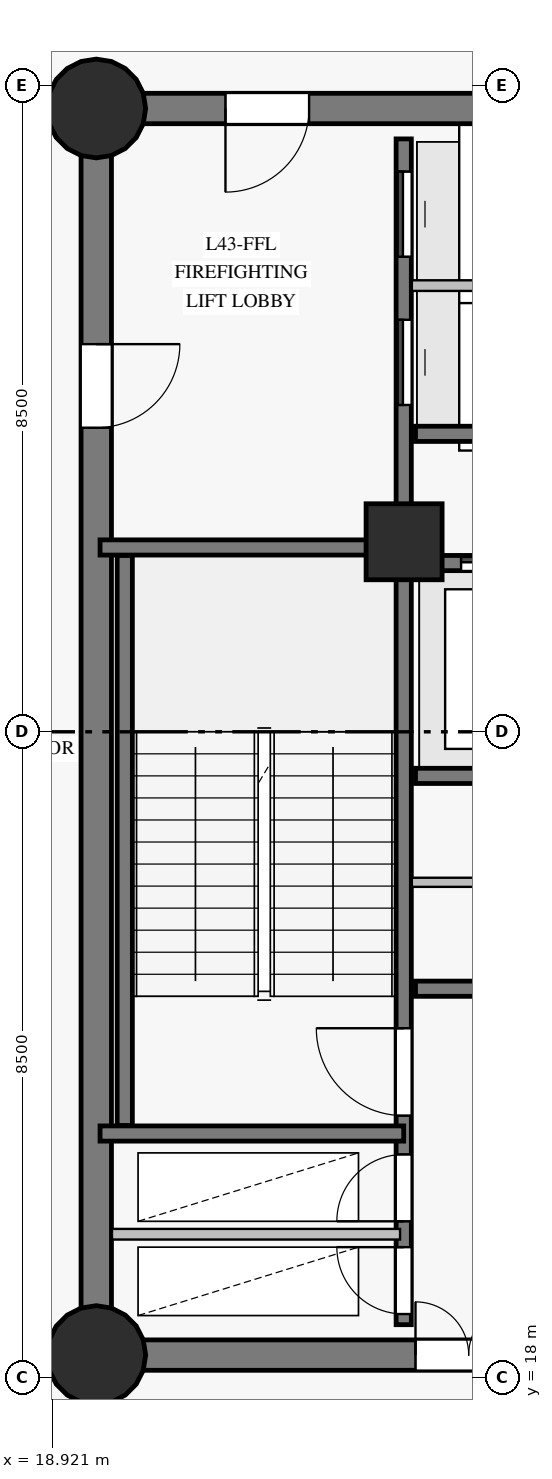
"""IFC4 building model, lengths in metres.
Left out: names, types, materials, properties, quantities, classifications, styles, units other than length and angle.
Written with IfcOpenShell. Run it as: python <this file> out.ifc"""

import sys

from ifc_helpers import new_model, si_unit, direction, frame, frame_2d, origin, origin_with_axes, origin_2d, place, context, subcontext, project, spatial, rectangle, circle, extrude, source, transform, mapped, element, fill, save


model = new_model("IFC4")
c1 = context("Model", 3, precision=1e-05, world=origin(), true_north=direction((0.0, 1.0)))
c2 = subcontext(c1, "Body", "Model", "MODEL_VIEW")
j1 = project(units=[si_unit("LENGTHUNIT", "METRE"), si_unit("PLANEANGLEUNIT", "RADIAN")], contexts=[c1])
p1 = place(None, origin())
s1 = spatial("IfcSite", under=j1, at=p1, CompositionType="ELEMENT")
p2 = place(p1, origin())
s2 = spatial("IfcBuilding", under=s1, at=p2, CompositionType="ELEMENT")
p3 = place(p2, frame((0.0, 0.0, 152.55)))
s3 = spatial("IfcBuildingStorey", under=s2, at=p3, CompositionType="ELEMENT", Elevation=152.55)
p4 = place(p3, frame((19.5, 18.3, 0.0), z_axis=(0.0, 0.0, 1.0), x_axis=(1.0, 0.0, 0.0)))
e1 = element("IfcWall", 1, at=p4, inside=s3, PredefinedType="SHEAR", context=c2, shape_type="SweptSolid", body=[
    extrude(rectangle(XDim=7.05, YDim=0.4, at=frame_2d((3.525, 0.0))), origin(), (0.0, 0.0, 1.0), 3.775),
])
p5 = place(p4, frame((4.2, 0.0, 0.0)))
e2 = element("IfcOpeningElement", 2, at=p5, cuts=e1, PredefinedType="OPENING", context=c2, shape_type="SweptSolid", body=[
    extrude(rectangle(XDim=1.4, YDim=2.2, at=frame_2d((0.7, 1.1))), frame((0.0, 0.21, 0.0), z_axis=(0.0, -1.0, 0.0), x_axis=(1.0, 0.0, 0.0)), (0.0, 0.0, 1.0), 0.42),
])
p6 = place(p3, frame((26.55, 34.7, 0.0), z_axis=(0.0, 0.0, 1.0), x_axis=(-1.0, 0.0, 0.0)))
e3 = element("IfcWall", 3, at=p6, inside=s3, PredefinedType="SHEAR", context=c2, shape_type="SweptSolid", body=[
    extrude(rectangle(XDim=7.05, YDim=0.4, at=frame_2d((3.525, 0.0))), origin(), (0.0, 0.0, 1.0), 3.775),
])
p7 = place(p6, frame((4.25, 0.0, 0.0)))
e4 = element("IfcOpeningElement", 4, at=p7, cuts=e3, PredefinedType="OPENING", context=c2, shape_type="SweptSolid", body=[
    extrude(rectangle(XDim=1.1, YDim=2.15, at=frame_2d((0.55, 1.075))), frame((0.0, 0.21, 0.0), z_axis=(0.0, -1.0, 0.0), x_axis=(1.0, 0.0, 0.0)), (0.0, 0.0, 1.0), 0.42),
])
p8 = place(p3, frame((19.5, 34.7, 0.0), z_axis=(0.0, 0.0, 1.0), x_axis=(0.0, -1.0, 0.0)))
e5 = element("IfcWall", 5, at=p8, inside=s3, PredefinedType="SHEAR", context=c2, shape_type="SweptSolid", body=[
    extrude(rectangle(XDim=16.4, YDim=0.4, at=frame_2d((8.2, 0.0))), origin(), (0.0, 0.0, 1.0), 3.775),
])
p9 = place(p8, frame((3.1, 0.0, 0.0)))
e6 = element("IfcOpeningElement", 6, at=p9, cuts=e5, PredefinedType="OPENING", context=c2, shape_type="SweptSolid", body=[
    extrude(rectangle(XDim=1.1, YDim=2.15, at=frame_2d((0.55, 1.075))), frame((0.0, 0.21, 0.0), z_axis=(0.0, -1.0, 0.0), x_axis=(1.0, 0.0, 0.0)), (0.0, 0.0, 1.0), 0.42),
])
m1 = source(origin_with_axes(), c2, "Body", "SweptSolid", [
    extrude(circle(Radius=0.65, at=origin_2d()), origin(), (0.0, 0.0, 1.0), 4.0),
])
for number, where, z_axis, x_axis in (
    (7, (19.5, 18.3, 0.0), (0.0, 0.0, 1.0), (1.0, 0.0, 0.0)),
    (8, (19.5, 34.7, 0.0), (0.0, 0.0, 1.0), (1.0, 0.0, 0.0)),
):
    element("IfcColumn", number, at=place(p3, frame(where, z_axis=z_axis, x_axis=x_axis)), inside=s3, PredefinedType="COLUMN", context=c2, shape_type="MappedRepresentation", body=[
        mapped(m1, transform((0.0, 0.0, 0.0), scale=1.0)),
    ])
m2 = source(origin_with_axes(), c2, "Body", "SweptSolid", [
    extrude(rectangle(XDim=1.0, YDim=1.0, at=origin_2d()), origin(), (0.0, 0.0, 1.0), 4.0),
])
p10 = place(p3, frame((23.55, 29.0, 0.0), z_axis=(0.0, 0.0, 1.0), x_axis=(1.0, 0.0, 0.0)))
e9 = element("IfcColumn", 9, at=p10, inside=s3, PredefinedType="COLUMN", context=c2, shape_type="MappedRepresentation", body=[
    mapped(m2, transform((0.0, 0.0, 0.0), scale=1.0)),
])
p11 = place(p3, frame((23.545, 18.7, 0.0), z_axis=(0.0, 0.0, 1.0), x_axis=(0.0, 1.0, 0.0)))
e10 = element("IfcWall", 10, at=p11, inside=s3, PredefinedType="SHEAR", context=c2, shape_type="SweptSolid", body=[
    extrude(rectangle(XDim=15.6, YDim=0.2, at=frame_2d((7.8, 0.0))), origin(), (0.0, 0.0, 1.0), 3.775),
])
p12 = place(p11, frame((2.75, 0.0, 0.0)))
e11 = element("IfcOpeningElement", 11, at=p12, cuts=e10, PredefinedType="OPENING", context=c2, shape_type="SweptSolid", body=[
    extrude(rectangle(XDim=1.15, YDim=2.15, at=frame_2d((0.575, 1.075))), frame((0.0, 0.11, 0.0), z_axis=(0.0, -1.0, 0.0), x_axis=(1.0, 0.0, 0.0)), (0.0, 0.0, 1.0), 0.22),
])
p13 = place(p11, frame((0.14, 0.0, 0.0)))
e12 = element("IfcOpeningElement", 12, at=p13, cuts=e10, PredefinedType="OPENING", context=c2, shape_type="SweptSolid", body=[
    extrude(rectangle(XDim=0.88, YDim=2.1, at=frame_2d((0.44, 1.05))), frame((0.0, 0.11, 0.0), z_axis=(0.0, -1.0, 0.0), x_axis=(1.0, 0.0, 0.0)), (0.0, 0.0, 1.0), 0.22),
])
p14 = place(p11, frame((1.36, 0.0, 0.0)))
e13 = element("IfcOpeningElement", 13, at=p14, cuts=e10, PredefinedType="OPENING", context=c2, shape_type="SweptSolid", body=[
    extrude(rectangle(XDim=0.88, YDim=2.1, at=frame_2d((0.44, 1.05))), frame((0.0, 0.11, 0.0), z_axis=(0.0, -1.0, 0.0), x_axis=(1.0, 0.0, 0.0)), (0.0, 0.0, 1.0), 0.22),
])
p15 = place(p11, frame((12.1, 0.0, 0.0)))
e14 = element("IfcOpeningElement", 14, at=p15, cuts=e10, PredefinedType="OPENING", context=c2, shape_type="SweptSolid", body=[
    extrude(rectangle(XDim=1.12, YDim=2.15, at=frame_2d((0.56, 1.075))), frame((0.0, 0.11, 0.0), z_axis=(0.0, -1.0, 0.0), x_axis=(1.0, 0.0, 0.0)), (0.0, 0.0, 1.0), 0.22),
])
p16 = place(p11, frame((14.05, 0.0, 0.0)))
e15 = element("IfcOpeningElement", 15, at=p16, cuts=e10, PredefinedType="OPENING", context=c2, shape_type="SweptSolid", body=[
    extrude(rectangle(XDim=1.12, YDim=2.15, at=frame_2d((0.56, 1.075))), frame((0.0, 0.11, 0.0), z_axis=(0.0, -1.0, 0.0), x_axis=(1.0, 0.0, 0.0)), (0.0, 0.0, 1.0), 0.22),
])
p17 = place(p3, frame((23.7, 23.12, 0.0), z_axis=(0.0, 0.0, 1.0), x_axis=(1.0, 0.0, 0.0)))
e16 = element("IfcWall", 16, at=p17, inside=s3, PredefinedType="SHEAR", context=c2, shape_type="SweptSolid", body=[
    extrude(rectangle(XDim=9.6, YDim=0.2, at=frame_2d((4.8, 0.0))), origin(), (0.0, 0.0, 1.0), 3.775),
])
p18 = place(p17, frame((2.4, 0.0, 0.0)))
e17 = element("IfcOpeningElement", 17, at=p18, cuts=e16, PredefinedType="OPENING", context=c2, shape_type="SweptSolid", body=[
    extrude(rectangle(XDim=1.0, YDim=2.15, at=frame_2d((0.5, 1.075))), frame((0.0, 0.11, 0.0), z_axis=(0.0, -1.0, 0.0), x_axis=(1.0, 0.0, 0.0)), (0.0, 0.0, 1.0), 0.22),
])
p19 = place(p3, frame((23.7, 25.92, 0.0), z_axis=(0.0, 0.0, 1.0), x_axis=(1.0, 0.0, 0.0)))
e18 = element("IfcWall", 18, at=p19, inside=s3, PredefinedType="SHEAR", context=c2, shape_type="SweptSolid", body=[
    extrude(rectangle(XDim=9.6, YDim=0.2, at=frame_2d((4.8, 0.0))), origin(), (0.0, 0.0, 1.0), 3.775),
])
p20 = place(p3, frame((23.7, 28.72, 0.0), z_axis=(0.0, 0.0, 1.0), x_axis=(1.0, 0.0, 0.0)))
e19 = element("IfcWall", 19, at=p20, inside=s3, PredefinedType="SHEAR", context=c2, shape_type="SweptSolid", body=[
    extrude(rectangle(XDim=9.6, YDim=0.2, at=frame_2d((4.8, 0.0))), origin(), (0.0, 0.0, 1.0), 3.775),
])
p21 = place(p20, frame((0.6, 0.0, 0.0)))
e20 = element("IfcOpeningElement", 20, at=p21, cuts=e19, PredefinedType="OPENING", context=c2, shape_type="SweptSolid", body=[
    extrude(rectangle(XDim=1.1, YDim=2.15, at=frame_2d((0.55, 1.075))), frame((0.0, 0.11, 0.0), z_axis=(0.0, -1.0, 0.0), x_axis=(1.0, 0.0, 0.0)), (0.0, 0.0, 1.0), 0.22),
])
p22 = place(p20, frame((2.98, 0.0, 0.0)))
e21 = element("IfcOpeningElement", 21, at=p22, cuts=e19, PredefinedType="OPENING", context=c2, shape_type="SweptSolid", body=[
    extrude(rectangle(XDim=1.1, YDim=2.15, at=frame_2d((0.55, 1.075))), frame((0.0, 0.11, 0.0), z_axis=(0.0, -1.0, 0.0), x_axis=(1.0, 0.0, 0.0)), (0.0, 0.0, 1.0), 0.22),
])
p23 = place(p20, frame((5.36, 0.0, 0.0)))
e22 = element("IfcOpeningElement", 22, at=p23, cuts=e19, PredefinedType="OPENING", context=c2, shape_type="SweptSolid", body=[
    extrude(rectangle(XDim=1.1, YDim=2.15, at=frame_2d((0.55, 1.075))), frame((0.0, 0.11, 0.0), z_axis=(0.0, -1.0, 0.0), x_axis=(1.0, 0.0, 0.0)), (0.0, 0.0, 1.0), 0.22),
])
p24 = place(p20, frame((7.74, 0.0, 0.0)))
e23 = element("IfcOpeningElement", 23, at=p24, cuts=e19, PredefinedType="OPENING", context=c2, shape_type="SweptSolid", body=[
    extrude(rectangle(XDim=1.1, YDim=2.15, at=frame_2d((0.55, 1.075))), frame((0.0, 0.11, 0.0), z_axis=(0.0, -1.0, 0.0), x_axis=(1.0, 0.0, 0.0)), (0.0, 0.0, 1.0), 0.22),
])
p25 = place(p3, frame((19.875, 21.32, 0.0), z_axis=(0.0, 0.0, 1.0), x_axis=(0.0, 1.0, 0.0)))
e24 = element("IfcWall", 24, at=p25, inside=s3, PredefinedType="SHEAR", context=c2, shape_type="SweptSolid", body=[
    extrude(rectangle(XDim=7.5, YDim=0.2, at=frame_2d((3.75, 0.0))), origin(), (0.0, 0.0, 1.0), 3.775),
])
for number, where, z_axis, x_axis in (
    (25, (19.55, 21.215, 0.0), (0.0, 0.0, 1.0), (1.0, 0.0, 0.0)),
    (26, (19.55, 28.925, 0.0), (0.0, 0.0, 1.0), (1.0, 0.0, 0.0)),
):
    element("IfcWall", number, at=place(p3, frame(where, z_axis=z_axis, x_axis=x_axis)), inside=s3, PredefinedType="SHEAR", context=c2, shape_type="SweptSolid", body=[
        extrude(rectangle(XDim=3.995, YDim=0.2, at=frame_2d((1.998, 0.0))), origin(), (0.0, 0.0, 1.0), 3.775),
    ])
p26 = place(p3, frame((23.7, 30.42, 0.0), z_axis=(0.0, 0.0, 1.0), x_axis=(1.0, 0.0, 0.0)))
e27 = element("IfcWall", 27, at=p26, inside=s3, PredefinedType="SHEAR", context=c2, shape_type="SweptSolid", body=[
    extrude(rectangle(XDim=2.78, YDim=0.2, at=frame_2d((1.39, 0.0))), origin(), (0.0, 0.0, 1.0), 3.775),
])
p27 = place(p3, frame((23.652, 24.52, 0.0), z_axis=(0.0, 0.0, 1.0), x_axis=(1.0, 0.0, 0.0)))
e28 = element("IfcWall", 28, at=p27, inside=s3, PredefinedType="PARTITIONING", context=c2, shape_type="SweptSolid", body=[
    extrude(rectangle(XDim=9.698, YDim=0.12, at=frame_2d((4.849, 0.0))), origin(), (0.0, 0.0, 1.0), 3.775),
])
p28 = place(p27, frame((4.2, 0.0, 0.0)))
e29 = element("IfcOpeningElement", 29, at=p28, cuts=e28, PredefinedType="OPENING", context=c2, shape_type="SweptSolid", body=[
    extrude(rectangle(XDim=0.94, YDim=2.1, at=frame_2d((0.47, 1.05))), frame((0.0, 0.07, 0.0), z_axis=(0.0, -1.0, 0.0), x_axis=(1.0, 0.0, 0.0)), (0.0, 0.0, 1.0), 0.14),
])
p29 = place(p3, frame((19.707, 19.89, 0.0), z_axis=(0.0, 0.0, 1.0), x_axis=(1.0, 0.0, 0.0)))
e30 = element("IfcWall", 30, at=p29, inside=s3, PredefinedType="PARTITIONING", context=c2, shape_type="SweptSolid", body=[
    extrude(rectangle(XDim=3.79, YDim=0.14, at=frame_2d((1.895, 0.0))), origin(), (0.0, 0.0, 1.0), 3.775),
])
p30 = place(p3, frame((23.652, 32.37, 0.0), z_axis=(0.0, 0.0, 1.0), x_axis=(1.0, 0.0, 0.0)))
e31 = element("IfcWall", 31, at=p30, inside=s3, PredefinedType="PARTITIONING", context=c2, shape_type="SweptSolid", body=[
    extrude(rectangle(XDim=2.828, YDim=0.14, at=frame_2d((1.414, 0.0))), origin(), (0.0, 0.0, 1.0), 3.775),
])
m3 = source(origin_with_axes(), c2, "Body", "SweptSolid", [
    extrude(rectangle(XDim=1.15, YDim=2.15, at=frame_2d((0.575, 1.075))), frame((0.0, 0.025, 0.0), z_axis=(0.0, -1.0, 0.0), x_axis=(1.0, 0.0, 0.0)), (0.0, 0.0, 1.0), 0.05),
])
p31 = place(p12, origin())
e32 = element("IfcDoor", 32, at=p31, inside=s3, OperationType="SINGLE_SWING_RIGHT", PredefinedType="DOOR", context=c2, shape_type="MappedRepresentation", body=[
    mapped(m3, transform((0.0, 0.0, 0.0), scale=1.0)),
])
fill(e11, e32)
m4 = source(origin_with_axes(), c2, "Body", "SweptSolid", [
    extrude(rectangle(XDim=1.1, YDim=2.15, at=frame_2d((0.55, 1.075))), frame((0.0, 0.025, 0.0), z_axis=(0.0, -1.0, 0.0), x_axis=(1.0, 0.0, 0.0)), (0.0, 0.0, 1.0), 0.05),
])
p32 = place(p7, origin())
e33 = element("IfcDoor", 33, at=p32, inside=s3, OperationType="SINGLE_SWING_RIGHT", PredefinedType="DOOR", context=c2, shape_type="MappedRepresentation", body=[
    mapped(m4, transform((0.0, 0.0, 0.0), scale=1.0)),
])
fill(e4, e33)
p33 = place(p9, origin())
e34 = element("IfcDoor", 34, at=p33, inside=s3, OperationType="SINGLE_SWING_LEFT", PredefinedType="DOOR", context=c2, shape_type="MappedRepresentation", body=[
    mapped(m4, transform((0.0, 0.0, 0.0), scale=1.0)),
])
fill(e6, e34)
m5 = source(origin_with_axes(), c2, "Body", "SweptSolid", [
    extrude(rectangle(XDim=0.88, YDim=2.1, at=frame_2d((0.44, 1.05))), frame((0.0, 0.025, 0.0), z_axis=(0.0, -1.0, 0.0), x_axis=(1.0, 0.0, 0.0)), (0.0, 0.0, 1.0), 0.05),
])
p34 = place(p13, origin())
e35 = element("IfcDoor", 35, at=p34, inside=s3, OperationType="SINGLE_SWING_RIGHT", PredefinedType="DOOR", context=c2, shape_type="MappedRepresentation", body=[
    mapped(m5, transform((0.0, 0.0, 0.0), scale=1.0)),
])
fill(e12, e35)
p35 = place(p14, origin())
e36 = element("IfcDoor", 36, at=p35, inside=s3, OperationType="SINGLE_SWING_LEFT", PredefinedType="DOOR", context=c2, shape_type="MappedRepresentation", body=[
    mapped(m5, transform((0.0, 0.0, 0.0), scale=1.0)),
])
fill(e13, e36)
m6 = source(origin_with_axes(), c2, "Body", "SweptSolid", [
    extrude(rectangle(XDim=1.4, YDim=2.2, at=frame_2d((0.7, 1.1))), frame((0.0, 0.025, 0.0), z_axis=(0.0, -1.0, 0.0), x_axis=(1.0, 0.0, 0.0)), (0.0, 0.0, 1.0), 0.05),
])
p36 = place(p5, origin())
e37 = element("IfcDoor", 37, at=p36, inside=s3, OperationType="DOUBLE_DOOR_SINGLE_SWING", PredefinedType="DOOR", context=c2, shape_type="MappedRepresentation", body=[
    mapped(m6, transform((0.0, 0.0, 0.0), scale=1.0)),
])
fill(e2, e37)
p37 = place(p21, origin())
e38 = element("IfcDoor", 38, at=p37, inside=s3, OperationType="SLIDING_TO_LEFT", PredefinedType="DOOR", context=c2, shape_type="MappedRepresentation", body=[
    mapped(m4, transform((0.0, 0.0, 0.0), scale=1.0)),
])
fill(e20, e38)
m7 = source(origin_with_axes(), c2, "Body", "SweptSolid", [
    extrude(rectangle(XDim=1.12, YDim=2.15, at=frame_2d((0.56, 1.075))), frame((0.0, 0.025, 0.0), z_axis=(0.0, -1.0, 0.0), x_axis=(1.0, 0.0, 0.0)), (0.0, 0.0, 1.0), 0.05),
])
p38 = place(p15, origin())
e39 = element("IfcDoor", 39, at=p38, inside=s3, OperationType="SLIDING_TO_LEFT", PredefinedType="DOOR", context=c2, shape_type="MappedRepresentation", body=[
    mapped(m7, transform((0.0, 0.0, 0.0), scale=1.0)),
])
fill(e14, e39)
p39 = place(p16, origin())
e40 = element("IfcDoor", 40, at=p39, inside=s3, OperationType="SLIDING_TO_RIGHT", PredefinedType="DOOR", context=c2, shape_type="MappedRepresentation", body=[
    mapped(m7, transform((0.0, 0.0, 0.0), scale=1.0)),
])
fill(e15, e40)
save(model, sys.argv[1])
